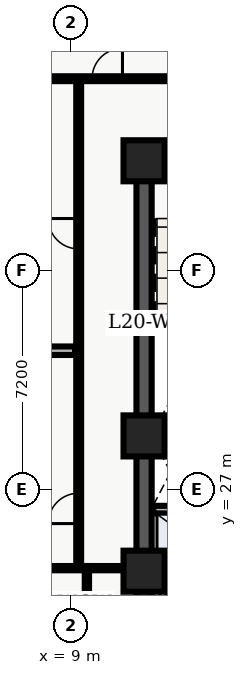
"""IFC4 building model, lengths in metres.
Left out: names, types, materials, properties, quantities, classifications, styles, units other than length and angle.
Written with IfcOpenShell. Run it as: python <this file> out.ifc"""

import sys

from ifc_helpers import new_model, entity, si_unit, converted_unit, direction, frame, origin_with_axes, origin_2d_with_axis, place, context, subcontext, project, spatial, polyline, rectangle, outline, extrude, element, fill, save


model = new_model("IFC4")
c1 = context("Model", 3, precision=1e-05, world=origin_with_axes(), true_north=direction((0.0, 1.0)))
c2 = subcontext(c1, "Body", "Model", "MODEL_VIEW")
j1 = project(units=[si_unit("LENGTHUNIT", "METRE"), converted_unit("PLANEANGLEUNIT", "DEGREE", entity("IfcPlaneAngleMeasure", 0.017), si_unit("PLANEANGLEUNIT", "RADIAN"), dimensions=[0, 0, 0, 0, 0, 0, 0])], contexts=[c1])
p1 = place(None, origin_with_axes())
s1 = spatial("IfcSite", under=j1, at=p1, CompositionType="ELEMENT")
p2 = place(p1, origin_with_axes())
s2 = spatial("IfcBuilding", under=s1, at=p2, CompositionType="ELEMENT")
p3 = place(p2, frame((0.0, 0.0, 84.6), z_axis=(0.0, 0.0, 1.0), x_axis=(1.0, 0.0, 0.0)))
s3 = spatial("IfcBuildingStorey", under=s2, at=p3, CompositionType="ELEMENT", Elevation=84.6)
p4 = place(p3, frame((11.4, 10.8, 0.0), z_axis=(0.0, 0.0, 1.0), x_axis=(0.0, 1.0, 0.0)))
e1 = element("IfcWall", 1, at=p4, inside=s3, PredefinedType="SHEAR", context=c2, shape_type="SweptSolid", body=[
    extrude(outline(polyline([(0.0, -0.25), (27.0, -0.25), (27.0, 0.25), (0.0, 0.25), (0.0, -0.25)])), origin_with_axes(), (0.0, 0.0, 1.0), 4.26),
])
p5 = place(p3, frame((11.4, 37.8, 0.0), z_axis=(0.0, 0.0, 1.0), x_axis=(1.0, 0.0, 0.0)))
e2 = element("IfcWall", 2, at=p5, inside=s3, PredefinedType="SHEAR", context=c2, shape_type="SweptSolid", body=[
    extrude(outline(polyline([(0.0, -0.25), (7.2, -0.25), (7.2, 0.25), (0.0, 0.25), (0.0, -0.25)])), origin_with_axes(), (0.0, 0.0, 1.0), 4.26),
])
p6 = place(p5, frame((2.625, 0.0, 0.0), z_axis=(0.0, 0.0, 1.0), x_axis=(1.0, 0.0, 0.0)))
e3 = element("IfcOpeningElement", 3, at=p6, cuts=e2, PredefinedType="OPENING", context=c2, shape_type="SweptSolid", body=[
    extrude(rectangle(XDim=1.05, YDim=0.52, at=origin_2d_with_axis()), origin_with_axes(), (0.0, 0.0, 1.0), 2.15),
])
p7 = place(p3, frame((11.65, 28.775, 0.0), z_axis=(0.0, 0.0, 1.0), x_axis=(1.0, 0.0, 0.0)))
e4 = element("IfcWall", 4, at=p7, inside=s3, PredefinedType="SHEAR", context=c2, shape_type="SweptSolid", body=[
    extrude(outline(polyline([(0.0, -0.125), (6.7, -0.125), (6.7, 0.125), (0.0, 0.125), (0.0, -0.125)])), origin_with_axes(), (0.0, 0.0, 1.0), 4.26),
])
p8 = place(p3, frame((11.7, 24.1, 0.0), z_axis=(0.0, 0.0, 1.0), x_axis=(1.0, 0.0, 0.0)))
e5 = element("IfcWall", 5, at=p8, inside=s3, PredefinedType="SOLIDWALL", context=c2, shape_type="SweptSolid", body=[
    extrude(outline(polyline([(0.0, -0.125), (6.6, -0.125), (6.6, 0.125), (0.0, 0.125), (0.0, -0.125)])), origin_with_axes(), (0.0, 0.0, 1.0), 3.3),
])
p9 = place(p8, frame((3.75, 0.0, 0.0), z_axis=(0.0, 0.0, 1.0), x_axis=(1.0, 0.0, 0.0)))
e6 = element("IfcOpeningElement", 6, at=p9, cuts=e5, PredefinedType="OPENING", context=c2, shape_type="SweptSolid", body=[
    extrude(rectangle(XDim=0.9, YDim=0.27, at=origin_2d_with_axis()), origin_with_axes(), (0.0, 0.0, 1.0), 2.15),
])
p10 = place(p3, frame((11.7, 26.325, 0.0), z_axis=(0.0, 0.0, 1.0), x_axis=(1.0, 0.0, 0.0)))
e7 = element("IfcWall", 7, at=p10, inside=s3, PredefinedType="SOLIDWALL", context=c2, shape_type="SweptSolid", body=[
    extrude(outline(polyline([(0.0, -0.125), (6.6, -0.125), (6.6, 0.125), (0.0, 0.125), (0.0, -0.125)])), origin_with_axes(), (0.0, 0.0, 1.0), 3.3),
])
p11 = place(p10, frame((3.5, 0.0, 0.0), z_axis=(0.0, 0.0, 1.0), x_axis=(1.0, 0.0, 0.0)))
e8 = element("IfcOpeningElement", 8, at=p11, cuts=e7, PredefinedType="OPENING", context=c2, shape_type="SweptSolid", body=[
    extrude(rectangle(XDim=0.9, YDim=0.27, at=origin_2d_with_axis()), origin_with_axes(), (0.0, 0.0, 1.0), 2.15),
])
for number, where, z_axis, x_axis in (
    (9, (11.4, 24.3, 0.0), (0.0, 0.0, 1.0), (1.0, 0.0, 0.0)),
    (10, (11.4, 28.75, 0.0), (0.0, 0.0, 1.0), (1.0, 0.0, 0.0)),
    (11, (11.4, 37.8, 0.0), (0.0, 0.0, 1.0), (1.0, 0.0, 0.0)),
):
    element("IfcColumn", number, at=place(p3, frame(where, z_axis=z_axis, x_axis=x_axis)), inside=s3, PredefinedType="COLUMN", context=c2, shape_type="SweptSolid", body=[
        extrude(rectangle(XDim=1.35, YDim=1.35, at=origin_2d_with_axis()), origin_with_axes(), (0.0, 0.0, 1.0), 4.5),
    ])
p12 = place(p3, frame((9.52, 20.4, 0.0), z_axis=(0.0, 0.0, 1.0), x_axis=(0.0, 1.0, 0.0)))
e12 = element("IfcWall", 12, at=p12, inside=s3, PredefinedType="PARTITIONING", context=c2, shape_type="SweptSolid", body=[
    extrude(outline(polyline([(0.0, -0.07), (4.0, -0.07), (4.0, 0.07), (0.0, 0.07), (0.0, -0.07)])), origin_with_axes(), (0.0, 0.0, 1.0), 3.2),
])
p13 = place(p3, frame((9.52, 24.4, 0.0), z_axis=(0.0, 0.0, 1.0), x_axis=(1.0, 0.0, 0.0)))
e13 = element("IfcWall", 13, at=p13, inside=s3, PredefinedType="PARTITIONING", context=c2, shape_type="SweptSolid", body=[
    extrude(outline(polyline([(0.0, -0.07), (1.58, -0.07), (1.58, 0.07), (0.0, 0.07), (0.0, -0.07)])), origin_with_axes(), (0.0, 0.0, 1.0), 3.2),
])
p14 = place(p3, frame((2.6, 40.5, 0.0), z_axis=(0.0, 0.0, 1.0), x_axis=(1.0, 0.0, 0.0)))
e14 = element("IfcWall", 14, at=p14, inside=s3, PredefinedType="PARTITIONING", context=c2, shape_type="SweptSolid", body=[
    extrude(outline(polyline([(0.0, -0.08), (18.65, -0.08), (18.65, 0.08), (0.0, 0.08), (0.0, -0.08)])), origin_with_axes(), (0.0, 0.0, 1.0), 3.2),
])
p15 = place(p14, frame((2.291, 0.0, 0.0), z_axis=(0.0, 0.0, 1.0), x_axis=(1.0, 0.0, 0.0)))
e15 = element("IfcOpeningElement", 15, at=p15, cuts=e14, PredefinedType="OPENING", context=c2, shape_type="SweptSolid", body=[
    extrude(rectangle(XDim=1.0, YDim=0.18, at=origin_2d_with_axis()), origin_with_axes(), (0.0, 0.0, 1.0), 2.15),
])
p16 = place(p14, frame((7.59, 0.0, 0.0), z_axis=(0.0, 0.0, 1.0), x_axis=(1.0, 0.0, 0.0)))
e16 = element("IfcOpeningElement", 16, at=p16, cuts=e14, PredefinedType="OPENING", context=c2, shape_type="SweptSolid", body=[
    extrude(rectangle(XDim=1.0, YDim=0.18, at=origin_2d_with_axis()), origin_with_axes(), (0.0, 0.0, 1.0), 2.15),
])
p17 = place(p14, frame((13.223, 0.0, 0.0), z_axis=(0.0, 0.0, 1.0), x_axis=(1.0, 0.0, 0.0)))
e17 = element("IfcOpeningElement", 17, at=p17, cuts=e14, PredefinedType="OPENING", context=c2, shape_type="SweptSolid", body=[
    extrude(rectangle(XDim=1.2, YDim=0.18, at=origin_2d_with_axis()), origin_with_axes(), (0.0, 0.0, 1.0), 2.2),
])
p18 = place(p3, frame((9.25, 24.4, 0.0), z_axis=(0.0, 0.0, 1.0), x_axis=(0.0, 1.0, 0.0)))
e18 = element("IfcWall", 18, at=p18, inside=s3, PredefinedType="PARTITIONING", context=c2, shape_type="SweptSolid", body=[
    extrude(outline(polyline([(0.0, -0.08), (16.1, -0.08), (16.1, 0.08), (0.0, 0.08), (0.0, -0.08)])), origin_with_axes(), (0.0, 0.0, 1.0), 3.2),
])
p19 = place(p18, frame((1.966, 0.0, 0.0), z_axis=(0.0, 0.0, 1.0), x_axis=(1.0, 0.0, 0.0)))
e19 = element("IfcOpeningElement", 19, at=p19, cuts=e18, PredefinedType="OPENING", context=c2, shape_type="SweptSolid", body=[
    extrude(rectangle(XDim=1.0, YDim=0.18, at=origin_2d_with_axis()), origin_with_axes(), (0.0, 0.0, 1.0), 2.15),
])
p20 = place(p18, frame((11.001, 0.0, 0.0), z_axis=(0.0, 0.0, 1.0), x_axis=(1.0, 0.0, 0.0)))
e20 = element("IfcOpeningElement", 20, at=p20, cuts=e18, PredefinedType="OPENING", context=c2, shape_type="SweptSolid", body=[
    extrude(rectangle(XDim=1.0, YDim=0.18, at=origin_2d_with_axis()), origin_with_axes(), (0.0, 0.0, 1.0), 2.15),
])
p21 = place(p3, frame((0.36, 24.4, 0.0), z_axis=(0.0, 0.0, 1.0), x_axis=(1.0, 0.0, 0.0)))
e21 = element("IfcWall", 21, at=p21, inside=s3, PredefinedType="PARTITIONING", context=c2, shape_type="SweptSolid", body=[
    extrude(outline(polyline([(0.0, -0.07), (9.16, -0.07), (9.16, 0.07), (0.0, 0.07), (0.0, -0.07)])), origin_with_axes(), (0.0, 0.0, 1.0), 3.2),
])
p22 = place(p3, frame((0.375, 31.552, 0.0), z_axis=(0.0, 0.0, 1.0), x_axis=(1.0, 0.0, 0.0)))
e22 = element("IfcWall", 22, at=p22, inside=s3, PredefinedType="PARTITIONING", context=c2, shape_type="SweptSolid", body=[
    extrude(outline(polyline([(0.0, -0.14), (8.755, -0.14), (8.755, 0.14), (0.0, 0.14), (0.0, -0.14)])), origin_with_axes(), (0.0, 0.0, 1.0), 3.2),
])
p23 = place(p18, frame((1.966, 0.0, 0.0), z_axis=(0.0, 0.0, 1.0), x_axis=(1.0, 0.0, 0.0)))
e23 = element("IfcDoor", 23, at=p23, inside=s3, OperationType="SINGLE_SWING_LEFT", PredefinedType="DOOR", context=c2, shape_type="SweptSolid", body=[
    extrude(rectangle(XDim=1.0, YDim=0.09, at=origin_2d_with_axis()), origin_with_axes(), (0.0, 0.0, 1.0), 2.15),
])
fill(e19, e23)
p24 = place(p18, frame((11.001, 0.0, 0.0), z_axis=(0.0, 0.0, 1.0), x_axis=(1.0, 0.0, 0.0)))
e24 = element("IfcDoor", 24, at=p24, inside=s3, OperationType="SINGLE_SWING_RIGHT", PredefinedType="DOOR", context=c2, shape_type="SweptSolid", body=[
    extrude(rectangle(XDim=1.0, YDim=0.09, at=origin_2d_with_axis()), origin_with_axes(), (0.0, 0.0, 1.0), 2.15),
])
fill(e20, e24)
p25 = place(p14, frame((7.59, 0.0, 0.0), z_axis=(0.0, 0.0, 1.0), x_axis=(1.0, 0.0, 0.0)))
e25 = element("IfcDoor", 25, at=p25, inside=s3, OperationType="SINGLE_SWING_RIGHT", PredefinedType="DOOR", context=c2, shape_type="SweptSolid", body=[
    extrude(rectangle(XDim=1.0, YDim=0.09, at=origin_2d_with_axis()), origin_with_axes(), (0.0, 0.0, 1.0), 2.15),
])
fill(e16, e25)
save(model, sys.argv[1])
